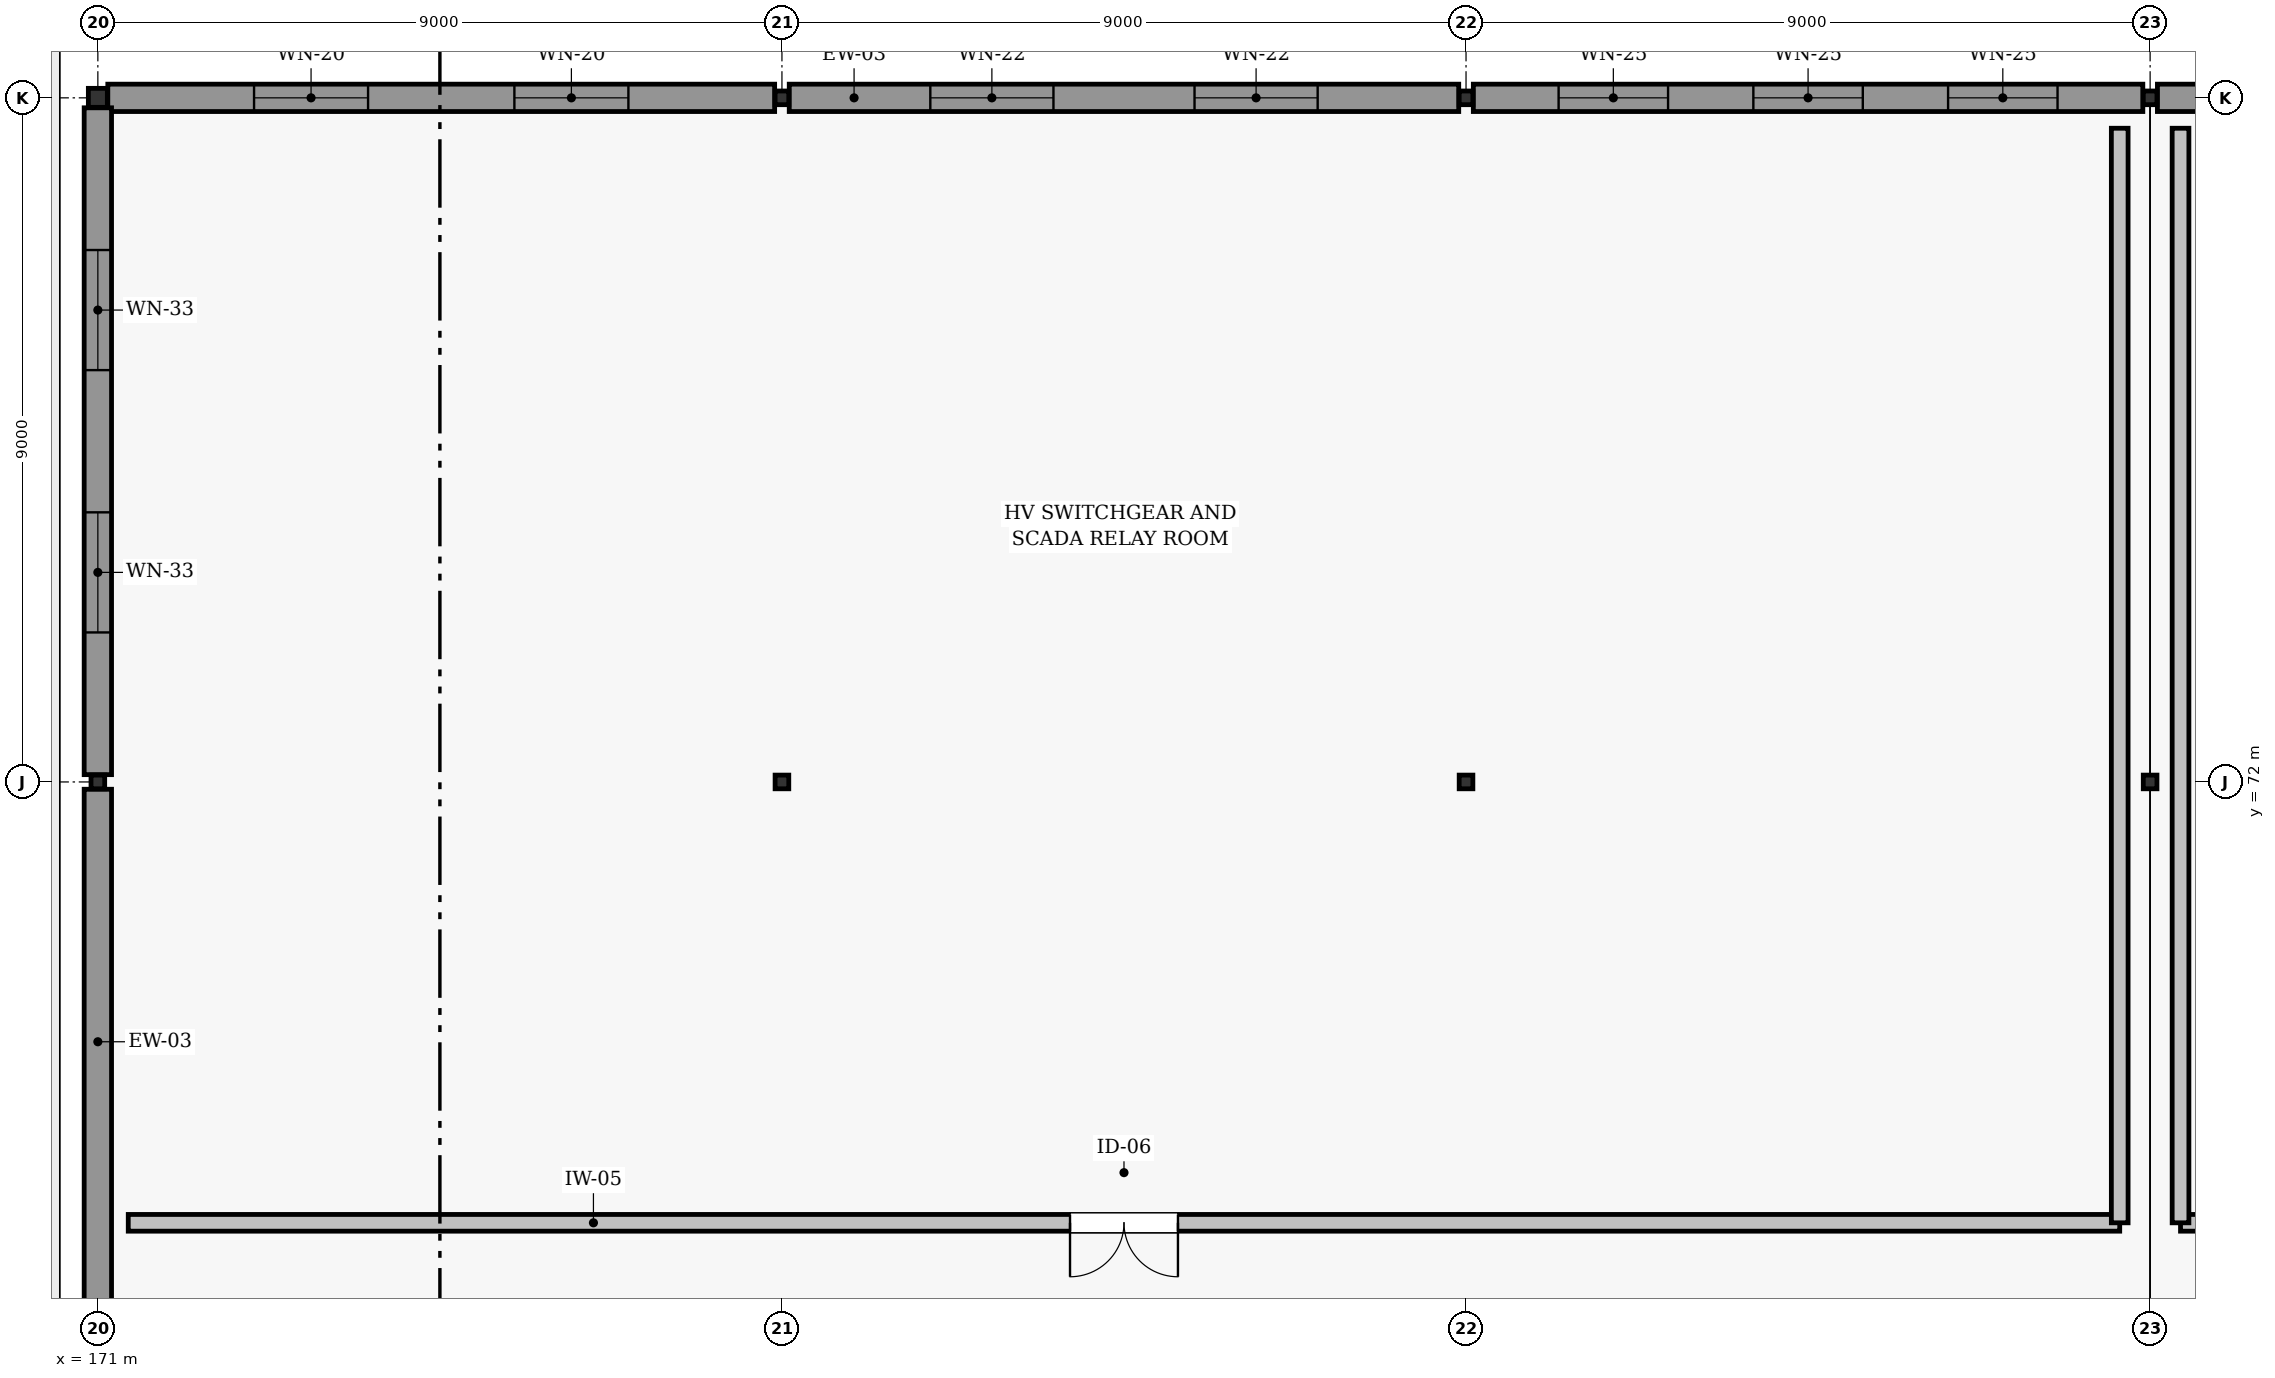
"""IFC4 building model, lengths in metres.
Left out: names, types, materials, properties, quantities, classifications, styles, units other than length and angle.
Written with IfcOpenShell. Run it as: python <this file> out.ifc"""

import sys

from ifc_helpers import new_model, si_unit, direction, frame, frame_2d, origin, origin_2d, place, context, subcontext, project, spatial, rectangle, hollow_rectangle, extrude, element, fill, save


model = new_model("IFC4")
c1 = context("Model", 3, precision=1e-05, world=origin(), true_north=direction((0.0, 1.0)))
c2 = subcontext(c1, "Body", "Model", "MODEL_VIEW")
j1 = project(units=[si_unit("LENGTHUNIT", "METRE"), si_unit("PLANEANGLEUNIT", "RADIAN")], contexts=[c1])
p1 = place(None, origin())
s1 = spatial("IfcSite", under=j1, at=p1, CompositionType="ELEMENT")
p2 = place(p1, origin())
s2 = spatial("IfcBuilding", under=s1, at=p2, CompositionType="ELEMENT")
p3 = place(p2, origin())
s3 = spatial("IfcBuildingStorey", under=s2, at=p3, CompositionType="ELEMENT", Elevation=0.0)
p4 = place(p3, frame((171.0, 72.0, 0.0), z_axis=(0.0, 0.0, 1.0), x_axis=(1.0, 0.0, 0.0)))
e1 = element("IfcColumn", 1, at=p4, inside=s3, PredefinedType="COLUMN", context=c2, shape_type="SweptSolid", body=[
    extrude(hollow_rectangle(XDim=0.18, YDim=0.18, WallThickness=0.008, InnerFilletRadius=0.008, OuterFilletRadius=0.016, at=origin_2d()), origin(), (0.0, 0.0, 1.0), 4.8),
])
p5 = place(p3, frame((171.0, 81.0, 0.0), z_axis=(0.0, 0.0, 1.0), x_axis=(1.0, 0.0, 0.0)))
e2 = element("IfcColumn", 2, at=p5, inside=s3, PredefinedType="COLUMN", context=c2, shape_type="SweptSolid", body=[
    extrude(hollow_rectangle(XDim=0.25, YDim=0.25, WallThickness=0.01, InnerFilletRadius=0.01, OuterFilletRadius=0.02, at=origin_2d()), origin(), (0.0, 0.0, 1.0), 4.8),
])
for number, where, z_axis, x_axis in (
    (3, (180.0, 72.0, 0.0), (0.0, 0.0, 1.0), (1.0, 0.0, 0.0)),
    (4, (180.0, 81.0, 0.0), (0.0, 0.0, 1.0), (1.0, 0.0, 0.0)),
    (5, (189.0, 72.0, 0.0), (0.0, 0.0, 1.0), (1.0, 0.0, 0.0)),
    (6, (189.0, 81.0, 0.0), (0.0, 0.0, 1.0), (1.0, 0.0, 0.0)),
    (7, (198.0, 72.0, 0.0), (0.0, 0.0, 1.0), (1.0, 0.0, 0.0)),
    (8, (198.0, 81.0, 0.0), (0.0, 0.0, 1.0), (1.0, 0.0, 0.0)),
):
    element("IfcColumn", number, at=place(p3, frame(where, z_axis=z_axis, x_axis=x_axis)), inside=s3, PredefinedType="COLUMN", context=c2, shape_type="SweptSolid", body=[
        extrude(hollow_rectangle(XDim=0.18, YDim=0.18, WallThickness=0.008, InnerFilletRadius=0.008, OuterFilletRadius=0.016, at=origin_2d()), origin(), (0.0, 0.0, 1.0), 4.8),
    ])
p6 = place(p3, frame((171.131, 81.0, 0.0), z_axis=(0.0, 0.0, 1.0), x_axis=(1.0, 0.0, 0.0)))
e9 = element("IfcWall", 9, at=p6, inside=s3, PredefinedType="SOLIDWALL", context=c2, shape_type="SweptSolid", body=[
    extrude(rectangle(XDim=8.773, YDim=0.36, at=frame_2d((4.386, 0.0))), origin(), (0.0, 0.0, 1.0), 4.142),
])
p7 = place(p6, frame((1.924, 0.0, 0.85)))
e10 = element("IfcOpeningElement", 10, at=p7, cuts=e9, PredefinedType="OPENING", context=c2, shape_type="SweptSolid", body=[
    extrude(rectangle(XDim=1.5, YDim=1.55, at=frame_2d((0.75, 0.775))), frame((0.0, 0.19, 0.0), z_axis=(0.0, -1.0, 0.0), x_axis=(1.0, 0.0, 0.0)), (0.0, 0.0, 1.0), 0.38),
])
p8 = place(p6, frame((5.349, 0.0, 0.85)))
e11 = element("IfcOpeningElement", 11, at=p8, cuts=e9, PredefinedType="OPENING", context=c2, shape_type="SweptSolid", body=[
    extrude(rectangle(XDim=1.5, YDim=1.55, at=frame_2d((0.75, 0.775))), frame((0.0, 0.19, 0.0), z_axis=(0.0, -1.0, 0.0), x_axis=(1.0, 0.0, 0.0)), (0.0, 0.0, 1.0), 0.38),
])
p9 = place(p3, frame((180.096, 81.0, 0.0), z_axis=(0.0, 0.0, 1.0), x_axis=(1.0, 0.0, 0.0)))
e12 = element("IfcWall", 12, at=p9, inside=s3, PredefinedType="SOLIDWALL", context=c2, shape_type="SweptSolid", body=[
    extrude(rectangle(XDim=8.808, YDim=0.36, at=frame_2d((4.404, 0.0))), origin(), (0.0, 0.0, 1.0), 4.142),
])
p10 = place(p9, frame((1.856, 0.0, 0.85)))
e13 = element("IfcOpeningElement", 13, at=p10, cuts=e12, PredefinedType="OPENING", context=c2, shape_type="SweptSolid", body=[
    extrude(rectangle(XDim=1.62, YDim=1.48, at=frame_2d((0.81, 0.74))), frame((0.0, 0.19, 0.0), z_axis=(0.0, -1.0, 0.0), x_axis=(1.0, 0.0, 0.0)), (0.0, 0.0, 1.0), 0.38),
])
p11 = place(p9, frame((5.332, 0.0, 0.85)))
e14 = element("IfcOpeningElement", 14, at=p11, cuts=e12, PredefinedType="OPENING", context=c2, shape_type="SweptSolid", body=[
    extrude(rectangle(XDim=1.62, YDim=1.48, at=frame_2d((0.81, 0.74))), frame((0.0, 0.19, 0.0), z_axis=(0.0, -1.0, 0.0), x_axis=(1.0, 0.0, 0.0)), (0.0, 0.0, 1.0), 0.38),
])
p12 = place(p3, frame((189.096, 81.0, 0.0), z_axis=(0.0, 0.0, 1.0), x_axis=(1.0, 0.0, 0.0)))
e15 = element("IfcWall", 15, at=p12, inside=s3, PredefinedType="SOLIDWALL", context=c2, shape_type="SweptSolid", body=[
    extrude(rectangle(XDim=8.808, YDim=0.36, at=frame_2d((4.404, 0.0))), origin(), (0.0, 0.0, 1.0), 4.142),
])
p13 = place(p12, frame((1.122, 0.0, 0.85)))
e16 = element("IfcOpeningElement", 16, at=p13, cuts=e15, PredefinedType="OPENING", context=c2, shape_type="SweptSolid", body=[
    extrude(rectangle(XDim=1.44, YDim=1.42, at=frame_2d((0.72, 0.71))), frame((0.0, 0.19, 0.0), z_axis=(0.0, -1.0, 0.0), x_axis=(1.0, 0.0, 0.0)), (0.0, 0.0, 1.0), 0.38),
])
p14 = place(p12, frame((3.684, 0.0, 0.85)))
e17 = element("IfcOpeningElement", 17, at=p14, cuts=e15, PredefinedType="OPENING", context=c2, shape_type="SweptSolid", body=[
    extrude(rectangle(XDim=1.44, YDim=1.42, at=frame_2d((0.72, 0.71))), frame((0.0, 0.19, 0.0), z_axis=(0.0, -1.0, 0.0), x_axis=(1.0, 0.0, 0.0)), (0.0, 0.0, 1.0), 0.38),
])
p15 = place(p12, frame((6.246, 0.0, 0.85)))
e18 = element("IfcOpeningElement", 18, at=p15, cuts=e15, PredefinedType="OPENING", context=c2, shape_type="SweptSolid", body=[
    extrude(rectangle(XDim=1.44, YDim=1.42, at=frame_2d((0.72, 0.71))), frame((0.0, 0.19, 0.0), z_axis=(0.0, -1.0, 0.0), x_axis=(1.0, 0.0, 0.0)), (0.0, 0.0, 1.0), 0.38),
])
p16 = place(p3, frame((198.096, 81.0, 0.0), z_axis=(0.0, 0.0, 1.0), x_axis=(1.0, 0.0, 0.0)))
e19 = element("IfcWall", 19, at=p16, inside=s3, PredefinedType="SOLIDWALL", context=c2, shape_type="SweptSolid", body=[
    extrude(rectangle(XDim=8.808, YDim=0.36, at=frame_2d((4.404, 0.0))), origin(), (0.0, 0.0, 1.0), 4.142),
])
p17 = place(p16, frame((1.182, 0.0, 0.85)))
e20 = element("IfcOpeningElement", 20, at=p17, cuts=e19, PredefinedType="OPENING", context=c2, shape_type="SweptSolid", body=[
    extrude(rectangle(XDim=1.36, YDim=1.38, at=frame_2d((0.68, 0.69))), frame((0.0, 0.19, 0.0), z_axis=(0.0, -1.0, 0.0), x_axis=(1.0, 0.0, 0.0)), (0.0, 0.0, 1.0), 0.38),
])
p18 = place(p16, frame((3.724, 0.0, 0.85)))
e21 = element("IfcOpeningElement", 21, at=p18, cuts=e19, PredefinedType="OPENING", context=c2, shape_type="SweptSolid", body=[
    extrude(rectangle(XDim=1.36, YDim=1.38, at=frame_2d((0.68, 0.69))), frame((0.0, 0.19, 0.0), z_axis=(0.0, -1.0, 0.0), x_axis=(1.0, 0.0, 0.0)), (0.0, 0.0, 1.0), 0.38),
])
p19 = place(p16, frame((6.266, 0.0, 0.85)))
e22 = element("IfcOpeningElement", 22, at=p19, cuts=e19, PredefinedType="OPENING", context=c2, shape_type="SweptSolid", body=[
    extrude(rectangle(XDim=1.36, YDim=1.38, at=frame_2d((0.68, 0.69))), frame((0.0, 0.19, 0.0), z_axis=(0.0, -1.0, 0.0), x_axis=(1.0, 0.0, 0.0)), (0.0, 0.0, 1.0), 0.38),
])
p20 = place(p3, frame((171.0, 63.106, 0.0), z_axis=(0.0, 0.0, 1.0), x_axis=(0.0, 1.0, 0.0)))
e23 = element("IfcWall", 23, at=p20, inside=s3, PredefinedType="SOLIDWALL", context=c2, shape_type="SweptSolid", body=[
    extrude(rectangle(XDim=8.798, YDim=0.36, at=frame_2d((4.399, 0.0))), origin(), (0.0, 0.0, 1.0), 4.142),
])
p21 = place(p20, frame((0.884, 0.0, 0.0)))
e24 = element("IfcOpeningElement", 24, at=p21, cuts=e23, PredefinedType="OPENING", context=c2, shape_type="SweptSolid", body=[
    extrude(rectangle(XDim=1.12, YDim=2.14, at=frame_2d((0.56, 1.07))), frame((0.0, 0.19, 0.0), z_axis=(0.0, -1.0, 0.0), x_axis=(1.0, 0.0, 0.0)), (0.0, 0.0, 1.0), 0.38),
])
p22 = place(p3, frame((171.0, 72.096, 0.0), z_axis=(0.0, 0.0, 1.0), x_axis=(0.0, 1.0, 0.0)))
e25 = element("IfcWall", 25, at=p22, inside=s3, PredefinedType="SOLIDWALL", context=c2, shape_type="SweptSolid", body=[
    extrude(rectangle(XDim=8.773, YDim=0.36, at=frame_2d((4.386, 0.0))), origin(), (0.0, 0.0, 1.0), 4.142),
])
p23 = place(p22, frame((1.871, 0.0, 0.85)))
e26 = element("IfcOpeningElement", 26, at=p23, cuts=e25, PredefinedType="OPENING", context=c2, shape_type="SweptSolid", body=[
    extrude(rectangle(XDim=1.58, YDim=1.6, at=frame_2d((0.79, 0.8))), frame((0.0, 0.19, 0.0), z_axis=(0.0, -1.0, 0.0), x_axis=(1.0, 0.0, 0.0)), (0.0, 0.0, 1.0), 0.38),
])
p24 = place(p22, frame((5.322, 0.0, 0.85)))
e27 = element("IfcOpeningElement", 27, at=p24, cuts=e25, PredefinedType="OPENING", context=c2, shape_type="SweptSolid", body=[
    extrude(rectangle(XDim=1.58, YDim=1.6, at=frame_2d((0.79, 0.8))), frame((0.0, 0.19, 0.0), z_axis=(0.0, -1.0, 0.0), x_axis=(1.0, 0.0, 0.0)), (0.0, 0.0, 1.0), 0.38),
])
p25 = place(p3, frame((171.4, 66.2, 0.0), z_axis=(0.0, 0.0, 1.0), x_axis=(1.0, 0.0, 0.0)))
e28 = element("IfcWall", 28, at=p25, inside=s3, PredefinedType="SOLIDWALL", context=c2, shape_type="SweptSolid", body=[
    extrude(rectangle(XDim=26.2, YDim=0.22, at=frame_2d((13.1, 0.0))), origin(), (0.0, 0.0, 1.0), 4.145),
])
p26 = place(p25, frame((12.39, 0.0, 0.0)))
e29 = element("IfcOpeningElement", 29, at=p26, cuts=e28, PredefinedType="OPENING", context=c2, shape_type="SweptSolid", body=[
    extrude(rectangle(XDim=1.42, YDim=2.12, at=frame_2d((0.71, 1.06))), frame((0.0, 0.12, 0.0), z_axis=(0.0, -1.0, 0.0), x_axis=(1.0, 0.0, 0.0)), (0.0, 0.0, 1.0), 0.24),
])
p27 = place(p3, frame((197.6, 66.2, 0.0), z_axis=(0.0, 0.0, 1.0), x_axis=(0.0, 1.0, 0.0)))
e30 = element("IfcWall", 30, at=p27, inside=s3, PredefinedType="SOLIDWALL", context=c2, shape_type="SweptSolid", body=[
    extrude(rectangle(XDim=14.4, YDim=0.22, at=frame_2d((7.2, 0.0))), origin(), (0.0, 0.0, 1.0), 4.55),
])
p28 = place(p3, frame((198.4, 66.2, 0.0), z_axis=(0.0, 0.0, 1.0), x_axis=(1.0, 0.0, 0.0)))
e31 = element("IfcWall", 31, at=p28, inside=s3, PredefinedType="SOLIDWALL", context=c2, shape_type="SweptSolid", body=[
    extrude(rectangle(XDim=17.2, YDim=0.22, at=frame_2d((8.6, 0.0))), origin(), (0.0, 0.0, 1.0), 4.145),
])
p29 = place(p28, frame((3.34, 0.0, 0.0)))
e32 = element("IfcOpeningElement", 32, at=p29, cuts=e31, PredefinedType="OPENING", context=c2, shape_type="SweptSolid", body=[
    extrude(rectangle(XDim=1.52, YDim=2.16, at=frame_2d((0.76, 1.08))), frame((0.0, 0.12, 0.0), z_axis=(0.0, -1.0, 0.0), x_axis=(1.0, 0.0, 0.0)), (0.0, 0.0, 1.0), 0.24),
])
p30 = place(p3, frame((198.4, 66.2, 0.0), z_axis=(0.0, 0.0, 1.0), x_axis=(0.0, 1.0, 0.0)))
e33 = element("IfcWall", 33, at=p30, inside=s3, PredefinedType="SOLIDWALL", context=c2, shape_type="SweptSolid", body=[
    extrude(rectangle(XDim=14.4, YDim=0.22, at=frame_2d((7.2, 0.0))), origin(), (0.0, 0.0, 1.0), 4.55),
])
p31 = place(p7, origin())
e34 = element("IfcWindow", 34, at=p31, inside=s3, PartitioningType="SINGLE_PANEL", PredefinedType="WINDOW", context=c2, shape_type="SweptSolid", body=[
    extrude(rectangle(XDim=1.5, YDim=1.55, at=frame_2d((0.75, 0.775))), frame((0.0, 0.03, 0.0), z_axis=(0.0, -1.0, 0.0), x_axis=(1.0, 0.0, 0.0)), (0.0, 0.0, 1.0), 0.06),
])
fill(e10, e34)
p32 = place(p8, origin())
e35 = element("IfcWindow", 35, at=p32, inside=s3, PartitioningType="SINGLE_PANEL", PredefinedType="WINDOW", context=c2, shape_type="SweptSolid", body=[
    extrude(rectangle(XDim=1.5, YDim=1.55, at=frame_2d((0.75, 0.775))), frame((0.0, 0.03, 0.0), z_axis=(0.0, -1.0, 0.0), x_axis=(1.0, 0.0, 0.0)), (0.0, 0.0, 1.0), 0.06),
])
fill(e11, e35)
p33 = place(p10, origin())
e36 = element("IfcWindow", 36, at=p33, inside=s3, PartitioningType="SINGLE_PANEL", PredefinedType="WINDOW", context=c2, shape_type="SweptSolid", body=[
    extrude(rectangle(XDim=1.62, YDim=1.48, at=frame_2d((0.81, 0.74))), frame((0.0, 0.03, 0.0), z_axis=(0.0, -1.0, 0.0), x_axis=(1.0, 0.0, 0.0)), (0.0, 0.0, 1.0), 0.06),
])
fill(e13, e36)
p34 = place(p11, origin())
e37 = element("IfcWindow", 37, at=p34, inside=s3, PartitioningType="SINGLE_PANEL", PredefinedType="WINDOW", context=c2, shape_type="SweptSolid", body=[
    extrude(rectangle(XDim=1.62, YDim=1.48, at=frame_2d((0.81, 0.74))), frame((0.0, 0.03, 0.0), z_axis=(0.0, -1.0, 0.0), x_axis=(1.0, 0.0, 0.0)), (0.0, 0.0, 1.0), 0.06),
])
fill(e14, e37)
p35 = place(p13, origin())
e38 = element("IfcWindow", 38, at=p35, inside=s3, PartitioningType="SINGLE_PANEL", PredefinedType="WINDOW", context=c2, shape_type="SweptSolid", body=[
    extrude(rectangle(XDim=1.44, YDim=1.42, at=frame_2d((0.72, 0.71))), frame((0.0, 0.03, 0.0), z_axis=(0.0, -1.0, 0.0), x_axis=(1.0, 0.0, 0.0)), (0.0, 0.0, 1.0), 0.06),
])
fill(e16, e38)
p36 = place(p14, origin())
e39 = element("IfcWindow", 39, at=p36, inside=s3, PartitioningType="SINGLE_PANEL", PredefinedType="WINDOW", context=c2, shape_type="SweptSolid", body=[
    extrude(rectangle(XDim=1.44, YDim=1.42, at=frame_2d((0.72, 0.71))), frame((0.0, 0.03, 0.0), z_axis=(0.0, -1.0, 0.0), x_axis=(1.0, 0.0, 0.0)), (0.0, 0.0, 1.0), 0.06),
])
fill(e17, e39)
p37 = place(p15, origin())
e40 = element("IfcWindow", 40, at=p37, inside=s3, PartitioningType="SINGLE_PANEL", PredefinedType="WINDOW", context=c2, shape_type="SweptSolid", body=[
    extrude(rectangle(XDim=1.44, YDim=1.42, at=frame_2d((0.72, 0.71))), frame((0.0, 0.03, 0.0), z_axis=(0.0, -1.0, 0.0), x_axis=(1.0, 0.0, 0.0)), (0.0, 0.0, 1.0), 0.06),
])
fill(e18, e40)
p38 = place(p23, origin())
e41 = element("IfcWindow", 41, at=p38, inside=s3, PartitioningType="SINGLE_PANEL", PredefinedType="WINDOW", context=c2, shape_type="SweptSolid", body=[
    extrude(rectangle(XDim=1.58, YDim=1.6, at=frame_2d((0.79, 0.8))), frame((0.0, 0.03, 0.0), z_axis=(0.0, -1.0, 0.0), x_axis=(1.0, 0.0, 0.0)), (0.0, 0.0, 1.0), 0.06),
])
fill(e26, e41)
p39 = place(p24, origin())
e42 = element("IfcWindow", 42, at=p39, inside=s3, PartitioningType="SINGLE_PANEL", PredefinedType="WINDOW", context=c2, shape_type="SweptSolid", body=[
    extrude(rectangle(XDim=1.58, YDim=1.6, at=frame_2d((0.79, 0.8))), frame((0.0, 0.03, 0.0), z_axis=(0.0, -1.0, 0.0), x_axis=(1.0, 0.0, 0.0)), (0.0, 0.0, 1.0), 0.06),
])
fill(e27, e42)
p40 = place(p26, frame((1.42, 0.0, 0.0), z_axis=(0.0, 0.0, 1.0), x_axis=(-1.0, 0.0, 0.0)))
e43 = element("IfcDoor", 43, at=p40, inside=s3, OperationType="DOUBLE_SWING_LEFT", PredefinedType="DOOR", context=c2, shape_type="SweptSolid", body=[
    extrude(rectangle(XDim=1.42, YDim=2.12, at=frame_2d((0.71, 1.06))), frame((0.0, 0.025, 0.0), z_axis=(0.0, -1.0, 0.0), x_axis=(1.0, 0.0, 0.0)), (0.0, 0.0, 1.0), 0.05),
])
fill(e29, e43)
save(model, sys.argv[1])
